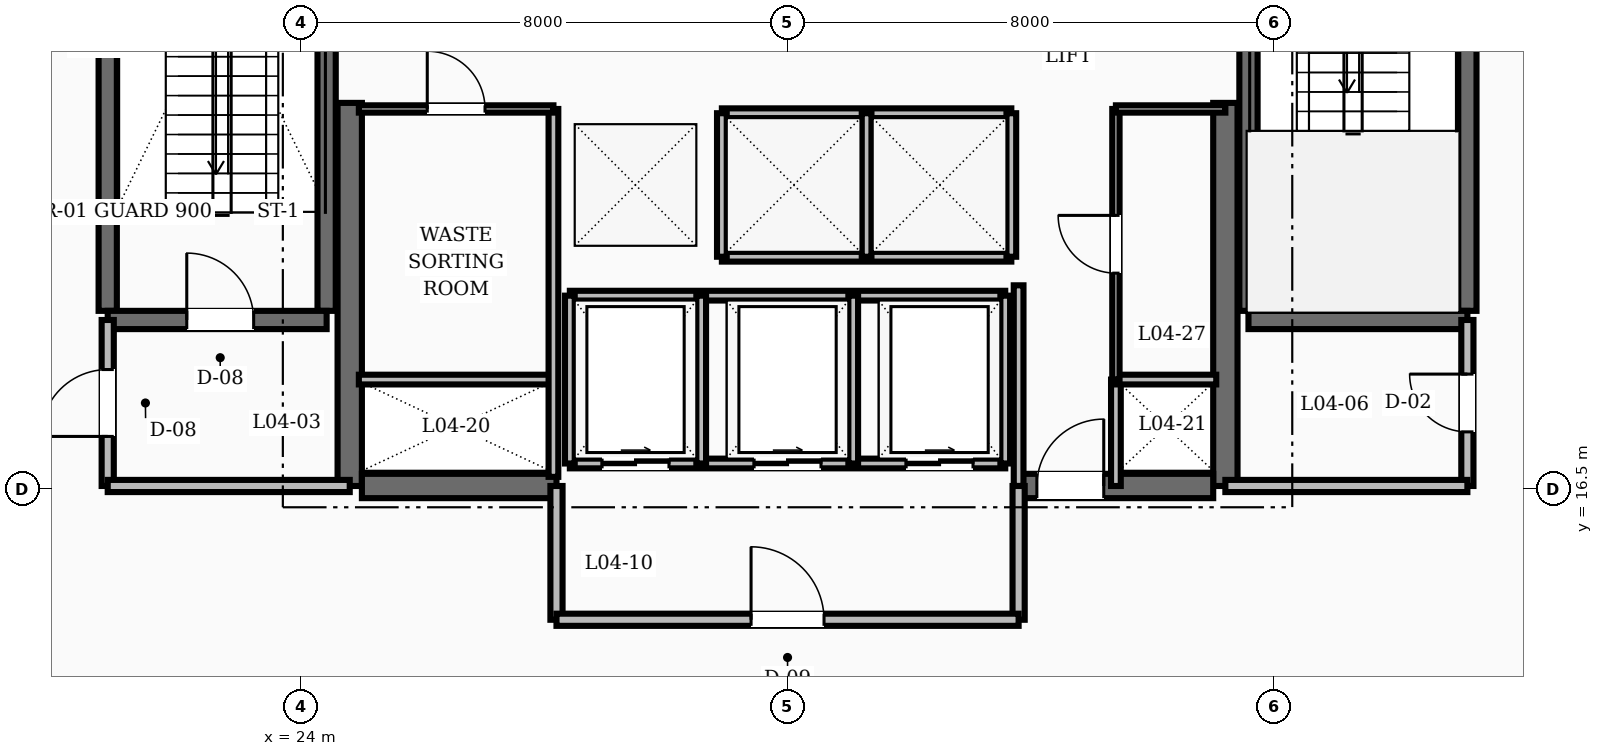
"""IFC4 building model, lengths in metres.
Left out: names, types, materials, properties, quantities, classifications, styles, units other than length and angle.
Written with IfcOpenShell. Run it as: python <this file> out.ifc"""

import sys

from ifc_helpers import new_model, si_unit, direction, frame, frame_2d, origin, place, context, subcontext, project, spatial, rectangle, extrude, element, fill, save


model = new_model("IFC4")
c1 = context("Model", 3, precision=1e-05, world=origin(), true_north=direction((0.0, 1.0)))
c2 = subcontext(c1, "Body", "Model", "MODEL_VIEW")
j1 = project(units=[si_unit("LENGTHUNIT", "METRE"), si_unit("PLANEANGLEUNIT", "RADIAN")], contexts=[c1])
p1 = place(None, origin())
s1 = spatial("IfcSite", under=j1, at=p1, CompositionType="ELEMENT")
p2 = place(p1, origin())
s2 = spatial("IfcBuilding", under=s1, at=p2, CompositionType="ELEMENT")
p3 = place(p2, frame((0.0, 0.0, 19.6)))
s3 = spatial("IfcBuildingStorey", under=s2, at=p3, CompositionType="ELEMENT", Elevation=19.6)
for number, where, z_axis, x_axis in (
    (1, (24.8, 16.55, 0.0), (0.0, 0.0, 1.0), (0.0, 1.0, 0.0)),
    (2, (39.2, 16.55, 0.0), (0.0, 0.0, 1.0), (0.0, 1.0, 0.0)),
):
    element("IfcWall", number, at=place(p3, frame(where, z_axis=z_axis, x_axis=x_axis)), inside=s3, PredefinedType="SHEAR", context=c2, shape_type="SweptSolid", body=[
        extrude(rectangle(XDim=6.3, YDim=0.4, at=frame_2d((3.15, 0.0))), origin(), (0.0, 0.0, 1.0), 4.8),
    ])
p4 = place(p3, frame((25.0, 16.55, 0.0), z_axis=(0.0, 0.0, 1.0), x_axis=(1.0, 0.0, 0.0)))
e3 = element("IfcWall", 3, at=p4, inside=s3, PredefinedType="SHEAR", context=c2, shape_type="SweptSolid", body=[
    extrude(rectangle(XDim=3.2, YDim=0.4, at=frame_2d((1.6, 0.0))), origin(), (0.0, 0.0, 1.0), 4.8),
])
p5 = place(p3, frame((35.8, 16.55, 0.0), z_axis=(0.0, 0.0, 1.0), x_axis=(1.0, 0.0, 0.0)))
e4 = element("IfcWall", 4, at=p5, inside=s3, PredefinedType="SHEAR", context=c2, shape_type="SweptSolid", body=[
    extrude(rectangle(XDim=3.2, YDim=0.4, at=frame_2d((1.6, 0.0))), origin(), (0.0, 0.0, 1.0), 4.8),
])
p6 = place(p5, frame((0.3, 0.0, 0.0)))
e5 = element("IfcOpeningElement", 5, at=p6, cuts=e4, PredefinedType="OPENING", context=c2, shape_type="SweptSolid", body=[
    extrude(rectangle(XDim=1.1, YDim=2.1, at=frame_2d((0.55, 1.05))), frame((0.0, 0.21, 0.0), z_axis=(0.0, -1.0, 0.0), x_axis=(1.0, 0.0, 0.0)), (0.0, 0.0, 1.0), 0.42),
])
for number, where, z_axis, x_axis in (
    (6, (20.82, 19.43, 0.0), (0.0, 0.0, 1.0), (0.0, 1.0, 0.0)),
    (7, (24.42, 19.43, 0.0), (0.0, 0.0, 1.0), (0.0, 1.0, 0.0)),
):
    element("IfcWall", number, at=place(p3, frame(where, z_axis=z_axis, x_axis=x_axis)), inside=s3, PredefinedType="SHEAR", context=c2, shape_type="SweptSolid", body=[
        extrude(rectangle(XDim=8.74, YDim=0.3, at=frame_2d((4.37, 0.0))), origin(), (0.0, 0.0, 1.0), 4.8),
    ])
p7 = place(p3, frame((20.82, 19.28, 0.0), z_axis=(0.0, 0.0, 1.0), x_axis=(1.0, 0.0, 0.0)))
e8 = element("IfcWall", 8, at=p7, inside=s3, PredefinedType="SHEAR", context=c2, shape_type="SweptSolid", body=[
    extrude(rectangle(XDim=3.6, YDim=0.3, at=frame_2d((1.8, 0.0))), origin(), (0.0, 0.0, 1.0), 4.8),
])
p8 = place(p7, frame((1.3, 0.0, 0.0)))
e9 = element("IfcOpeningElement", 9, at=p8, cuts=e8, PredefinedType="OPENING", context=c2, shape_type="SweptSolid", body=[
    extrude(rectangle(XDim=1.1, YDim=2.1, at=frame_2d((0.55, 1.05))), frame((0.0, 0.16, 0.0), z_axis=(0.0, -1.0, 0.0), x_axis=(1.0, 0.0, 0.0)), (0.0, 0.0, 1.0), 0.32),
])
for number, where, z_axis, x_axis in (
    (10, (43.18, 19.43, 0.0), (0.0, 0.0, 1.0), (0.0, 1.0, 0.0)),
    (11, (39.58, 19.43, 0.0), (0.0, 0.0, 1.0), (0.0, 1.0, 0.0)),
):
    element("IfcWall", number, at=place(p3, frame(where, z_axis=z_axis, x_axis=x_axis)), inside=s3, PredefinedType="SHEAR", context=c2, shape_type="SweptSolid", body=[
        extrude(rectangle(XDim=8.74, YDim=0.3, at=frame_2d((4.37, 0.0))), origin(), (0.0, 0.0, 1.0), 4.8),
    ])
p9 = place(p3, frame((39.58, 19.28, 0.0), z_axis=(0.0, 0.0, 1.0), x_axis=(1.0, 0.0, 0.0)))
e12 = element("IfcWall", 12, at=p9, inside=s3, PredefinedType="SHEAR", context=c2, shape_type="SweptSolid", body=[
    extrude(rectangle(XDim=3.6, YDim=0.3, at=frame_2d((1.8, 0.0))), origin(), (0.0, 0.0, 1.0), 4.8),
])
p10 = place(p3, frame((20.82, 16.55, 0.0), z_axis=(0.0, 0.0, 1.0), x_axis=(0.0, 1.0, 0.0)))
e13 = element("IfcWall", 13, at=p10, inside=s3, PredefinedType="SOLIDWALL", context=c2, shape_type="SweptSolid", body=[
    extrude(rectangle(XDim=2.73, YDim=0.2, at=frame_2d((1.365, 0.0))), origin(), (0.0, 0.0, 1.0), 3.42),
])
p11 = place(p10, frame((0.815, 0.0, 0.0)))
e14 = element("IfcOpeningElement", 14, at=p11, cuts=e13, PredefinedType="OPENING", context=c2, shape_type="SweptSolid", body=[
    extrude(rectangle(XDim=1.1, YDim=2.1, at=frame_2d((0.55, 1.05))), frame((0.0, 0.11, 0.0), z_axis=(0.0, -1.0, 0.0), x_axis=(1.0, 0.0, 0.0)), (0.0, 0.0, 1.0), 0.22),
])
p12 = place(p3, frame((20.82, 16.55, 0.0), z_axis=(0.0, 0.0, 1.0), x_axis=(1.0, 0.0, 0.0)))
e15 = element("IfcWall", 15, at=p12, inside=s3, PredefinedType="SOLIDWALL", context=c2, shape_type="SweptSolid", body=[
    extrude(rectangle(XDim=3.98, YDim=0.2, at=frame_2d((1.99, 0.0))), origin(), (0.0, 0.0, 1.0), 3.42),
])
p13 = place(p3, frame((43.18, 16.55, 0.0), z_axis=(0.0, 0.0, 1.0), x_axis=(0.0, 1.0, 0.0)))
e16 = element("IfcWall", 16, at=p13, inside=s3, PredefinedType="SOLIDWALL", context=c2, shape_type="SweptSolid", body=[
    extrude(rectangle(XDim=2.73, YDim=0.2, at=frame_2d((1.365, 0.0))), origin(), (0.0, 0.0, 1.0), 3.42),
])
p14 = place(p13, frame((0.89, 0.0, 0.0)))
e17 = element("IfcOpeningElement", 17, at=p14, cuts=e16, PredefinedType="OPENING", context=c2, shape_type="SweptSolid", body=[
    extrude(rectangle(XDim=0.95, YDim=2.1, at=frame_2d((0.475, 1.05))), frame((0.0, 0.11, 0.0), z_axis=(0.0, -1.0, 0.0), x_axis=(1.0, 0.0, 0.0)), (0.0, 0.0, 1.0), 0.22),
])
p15 = place(p3, frame((39.2, 16.55, 0.0), z_axis=(0.0, 0.0, 1.0), x_axis=(1.0, 0.0, 0.0)))
e18 = element("IfcWall", 18, at=p15, inside=s3, PredefinedType="SOLIDWALL", context=c2, shape_type="SweptSolid", body=[
    extrude(rectangle(XDim=3.98, YDim=0.2, at=frame_2d((1.99, 0.0))), origin(), (0.0, 0.0, 1.0), 3.42),
])
p16 = place(p3, frame((35.8, 16.55, 0.0), z_axis=(0.0, 0.0, 1.0), x_axis=(0.0, 1.0, 0.0)))
e19 = element("IfcWall", 19, at=p16, inside=s3, PredefinedType="SOLIDWALL", context=c2, shape_type="SweptSolid", body=[
    extrude(rectangle(XDim=3.3, YDim=0.16, at=frame_2d((1.65, 0.0))), origin(), (0.0, 0.0, 1.0), 3.42),
])
p17 = place(p3, frame((37.4, 16.55, 0.0), z_axis=(0.0, 0.0, 1.0), x_axis=(0.0, 1.0, 0.0)))
e20 = element("IfcWall", 20, at=p17, inside=s3, PredefinedType="SOLIDWALL", context=c2, shape_type="SweptSolid", body=[
    extrude(rectangle(XDim=1.75, YDim=0.16, at=frame_2d((0.875, 0.0))), origin(), (0.0, 0.0, 1.0), 3.42),
])
for number, where, z_axis, x_axis in (
    (21, (28.2, 14.35, 0.0), (0.0, 0.0, 1.0), (0.0, 1.0, 0.0)),
    (22, (35.8, 14.35, 0.0), (0.0, 0.0, 1.0), (0.0, 1.0, 0.0)),
):
    element("IfcWall", number, at=place(p3, frame(where, z_axis=z_axis, x_axis=x_axis)), inside=s3, PredefinedType="SOLIDWALL", context=c2, shape_type="SweptSolid", body=[
        extrude(rectangle(XDim=2.2, YDim=0.2, at=frame_2d((1.1, 0.0))), origin(), (0.0, 0.0, 1.0), 3.42),
    ])
p18 = place(p3, frame((28.2, 14.35, 0.0), z_axis=(0.0, 0.0, 1.0), x_axis=(1.0, 0.0, 0.0)))
e23 = element("IfcWall", 23, at=p18, inside=s3, PredefinedType="SOLIDWALL", context=c2, shape_type="SweptSolid", body=[
    extrude(rectangle(XDim=7.6, YDim=0.2, at=frame_2d((3.8, 0.0))), origin(), (0.0, 0.0, 1.0), 3.42),
])
p19 = place(p18, frame((3.2, 0.0, 0.0)))
e24 = element("IfcOpeningElement", 24, at=p19, cuts=e23, PredefinedType="OPENING", context=c2, shape_type="SweptSolid", body=[
    extrude(rectangle(XDim=1.2, YDim=2.1, at=frame_2d((0.6, 1.05))), frame((0.0, 0.11, 0.0), z_axis=(0.0, -1.0, 0.0), x_axis=(1.0, 0.0, 0.0)), (0.0, 0.0, 1.0), 0.22),
])
for number, where, z_axis, x_axis in (
    (25, (30.92, 22.68, 0.0), (0.0, 0.0, 1.0), (1.0, 0.0, 0.0)),
    (26, (30.92, 20.32, 0.0), (0.0, 0.0, 1.0), (1.0, 0.0, 0.0)),
):
    element("IfcWall", number, at=place(p3, frame(where, z_axis=z_axis, x_axis=x_axis)), inside=s3, PredefinedType="SOLIDWALL", context=c2, shape_type="SweptSolid", body=[
        extrude(rectangle(XDim=4.76, YDim=0.16, at=frame_2d((2.38, 0.0))), origin(), (0.0, 0.0, 1.0), 3.42),
    ])
for number, where, z_axis, x_axis in (
    (27, (30.92, 20.32, 0.0), (0.0, 0.0, 1.0), (0.0, 1.0, 0.0)),
    (28, (33.3, 20.32, 0.0), (0.0, 0.0, 1.0), (0.0, 1.0, 0.0)),
    (29, (35.68, 20.32, 0.0), (0.0, 0.0, 1.0), (0.0, 1.0, 0.0)),
):
    element("IfcWall", number, at=place(p3, frame(where, z_axis=z_axis, x_axis=x_axis)), inside=s3, PredefinedType="SOLIDWALL", context=c2, shape_type="SweptSolid", body=[
        extrude(rectangle(XDim=2.36, YDim=0.16, at=frame_2d((1.18, 0.0))), origin(), (0.0, 0.0, 1.0), 3.42),
    ])
p20 = place(p3, frame((28.42, 16.92, 0.0), z_axis=(0.0, 0.0, 1.0), x_axis=(1.0, 0.0, 0.0)))
e30 = element("IfcWall", 30, at=p20, inside=s3, PredefinedType="SOLIDWALL", context=c2, shape_type="SweptSolid", body=[
    extrude(rectangle(XDim=7.16, YDim=0.16, at=frame_2d((3.58, 0.0))), origin(), (0.0, 0.0, 1.0), 3.42),
])
p21 = place(p20, frame((0.53, 0.0, 0.0)))
e31 = element("IfcOpeningElement", 31, at=p21, cuts=e30, PredefinedType="OPENING", context=c2, shape_type="SweptSolid", body=[
    extrude(rectangle(XDim=1.1, YDim=2.15, at=frame_2d((0.55, 1.075))), frame((0.0, 0.09, 0.0), z_axis=(0.0, -1.0, 0.0), x_axis=(1.0, 0.0, 0.0)), (0.0, 0.0, 1.0), 0.18),
])
p22 = place(p20, frame((3.03, 0.0, 0.0)))
e32 = element("IfcOpeningElement", 32, at=p22, cuts=e30, PredefinedType="OPENING", context=c2, shape_type="SweptSolid", body=[
    extrude(rectangle(XDim=1.1, YDim=2.15, at=frame_2d((0.55, 1.075))), frame((0.0, 0.09, 0.0), z_axis=(0.0, -1.0, 0.0), x_axis=(1.0, 0.0, 0.0)), (0.0, 0.0, 1.0), 0.18),
])
p23 = place(p20, frame((5.53, 0.0, 0.0)))
e33 = element("IfcOpeningElement", 33, at=p23, cuts=e30, PredefinedType="OPENING", context=c2, shape_type="SweptSolid", body=[
    extrude(rectangle(XDim=1.1, YDim=2.15, at=frame_2d((0.55, 1.075))), frame((0.0, 0.09, 0.0), z_axis=(0.0, -1.0, 0.0), x_axis=(1.0, 0.0, 0.0)), (0.0, 0.0, 1.0), 0.18),
])
p24 = place(p3, frame((28.42, 19.68, 0.0), z_axis=(0.0, 0.0, 1.0), x_axis=(1.0, 0.0, 0.0)))
e34 = element("IfcWall", 34, at=p24, inside=s3, PredefinedType="SOLIDWALL", context=c2, shape_type="SweptSolid", body=[
    extrude(rectangle(XDim=7.16, YDim=0.16, at=frame_2d((3.58, 0.0))), origin(), (0.0, 0.0, 1.0), 3.42),
])
for number, where, z_axis, x_axis in (
    (35, (28.42, 16.92, 0.0), (0.0, 0.0, 1.0), (0.0, 1.0, 0.0)),
    (36, (30.58, 16.92, 0.0), (0.0, 0.0, 1.0), (0.0, 1.0, 0.0)),
    (37, (33.08, 16.92, 0.0), (0.0, 0.0, 1.0), (0.0, 1.0, 0.0)),
    (38, (35.58, 16.92, 0.0), (0.0, 0.0, 1.0), (0.0, 1.0, 0.0)),
):
    element("IfcWall", number, at=place(p3, frame(where, z_axis=z_axis, x_axis=x_axis)), inside=s3, PredefinedType="SOLIDWALL", context=c2, shape_type="SweptSolid", body=[
        extrude(rectangle(XDim=2.76, YDim=0.16, at=frame_2d((1.38, 0.0))), origin(), (0.0, 0.0, 1.0), 3.42),
    ])
p25 = place(p3, frame((24.95, 18.3, 0.0), z_axis=(0.0, 0.0, 1.0), x_axis=(1.0, 0.0, 0.0)))
e39 = element("IfcWall", 39, at=p25, inside=s3, PredefinedType="SOLIDWALL", context=c2, shape_type="SweptSolid", body=[
    extrude(rectangle(XDim=3.2, YDim=0.16, at=frame_2d((1.6, 0.0))), origin(), (0.0, 0.0, 1.0), 3.42),
])
p26 = place(p3, frame((28.15, 16.7, 0.0), z_axis=(0.0, 0.0, 1.0), x_axis=(0.0, 1.0, 0.0)))
e40 = element("IfcWall", 40, at=p26, inside=s3, PredefinedType="SOLIDWALL", context=c2, shape_type="SweptSolid", body=[
    extrude(rectangle(XDim=6.05, YDim=0.16, at=frame_2d((3.025, 0.0))), origin(), (0.0, 0.0, 1.0), 3.42),
])
p27 = place(p3, frame((37.4, 18.3, 0.0), z_axis=(0.0, 0.0, 1.0), x_axis=(1.0, 0.0, 0.0)))
e41 = element("IfcWall", 41, at=p27, inside=s3, PredefinedType="SOLIDWALL", context=c2, shape_type="SweptSolid", body=[
    extrude(rectangle(XDim=1.65, YDim=0.16, at=frame_2d((0.825, 0.0))), origin(), (0.0, 0.0, 1.0), 3.42),
])
p28 = place(p3, frame((24.95, 22.75, 0.0), z_axis=(0.0, 0.0, 1.0), x_axis=(1.0, 0.0, 0.0)))
e42 = element("IfcWall", 42, at=p28, inside=s3, PredefinedType="PARTITIONING", context=c2, shape_type="SweptSolid", body=[
    extrude(rectangle(XDim=3.2, YDim=0.12, at=frame_2d((1.6, 0.0))), origin(), (0.0, 0.0, 1.0), 3.42),
])
p29 = place(p28, frame((1.125, 0.0, 0.0)))
e43 = element("IfcOpeningElement", 43, at=p29, cuts=e42, PredefinedType="OPENING", context=c2, shape_type="SweptSolid", body=[
    extrude(rectangle(XDim=0.95, YDim=2.1, at=frame_2d((0.475, 1.05))), frame((0.0, 0.07, 0.0), z_axis=(0.0, -1.0, 0.0), x_axis=(1.0, 0.0, 0.0)), (0.0, 0.0, 1.0), 0.14),
])
p30 = place(p3, frame((37.4, 18.3, 0.0), z_axis=(0.0, 0.0, 1.0), x_axis=(0.0, 1.0, 0.0)))
e44 = element("IfcWall", 44, at=p30, inside=s3, PredefinedType="PARTITIONING", context=c2, shape_type="SweptSolid", body=[
    extrude(rectangle(XDim=4.45, YDim=0.12, at=frame_2d((2.225, 0.0))), origin(), (0.0, 0.0, 1.0), 3.42),
])
p31 = place(p30, frame((1.75, 0.0, 0.0)))
e45 = element("IfcOpeningElement", 45, at=p31, cuts=e44, PredefinedType="OPENING", context=c2, shape_type="SweptSolid", body=[
    extrude(rectangle(XDim=0.95, YDim=2.1, at=frame_2d((0.475, 1.05))), frame((0.0, 0.07, 0.0), z_axis=(0.0, -1.0, 0.0), x_axis=(1.0, 0.0, 0.0)), (0.0, 0.0, 1.0), 0.14),
])
p32 = place(p3, frame((37.4, 22.75, 0.0), z_axis=(0.0, 0.0, 1.0), x_axis=(1.0, 0.0, 0.0)))
e46 = element("IfcWall", 46, at=p32, inside=s3, PredefinedType="PARTITIONING", context=c2, shape_type="SweptSolid", body=[
    extrude(rectangle(XDim=1.8, YDim=0.12, at=frame_2d((0.9, 0.0))), origin(), (0.0, 0.0, 1.0), 3.42),
])
p33 = place(p8, origin())
e47 = element("IfcDoor", 47, at=p33, inside=s3, OperationType="SINGLE_SWING_LEFT", PredefinedType="DOOR", context=c2, shape_type="SweptSolid", body=[
    extrude(rectangle(XDim=1.1, YDim=2.1, at=frame_2d((0.55, 1.05))), frame((0.0, 0.025, 0.0), z_axis=(0.0, -1.0, 0.0), x_axis=(1.0, 0.0, 0.0)), (0.0, 0.0, 1.0), 0.05),
])
fill(e9, e47)
p34 = place(p11, origin())
e48 = element("IfcDoor", 48, at=p34, inside=s3, OperationType="SINGLE_SWING_LEFT", PredefinedType="DOOR", context=c2, shape_type="SweptSolid", body=[
    extrude(rectangle(XDim=1.1, YDim=2.1, at=frame_2d((0.55, 1.05))), frame((0.0, 0.025, 0.0), z_axis=(0.0, -1.0, 0.0), x_axis=(1.0, 0.0, 0.0)), (0.0, 0.0, 1.0), 0.05),
])
fill(e14, e48)
p35 = place(p14, origin())
e49 = element("IfcDoor", 49, at=p35, inside=s3, OperationType="SINGLE_SWING_RIGHT", PredefinedType="DOOR", context=c2, shape_type="SweptSolid", body=[
    extrude(rectangle(XDim=0.95, YDim=2.1, at=frame_2d((0.475, 1.05))), frame((0.0, 0.025, 0.0), z_axis=(0.0, -1.0, 0.0), x_axis=(1.0, 0.0, 0.0)), (0.0, 0.0, 1.0), 0.05),
])
fill(e17, e49)
p36 = place(p6, origin())
e50 = element("IfcDoor", 50, at=p36, inside=s3, OperationType="SINGLE_SWING_RIGHT", PredefinedType="DOOR", context=c2, shape_type="SweptSolid", body=[
    extrude(rectangle(XDim=1.1, YDim=2.1, at=frame_2d((0.55, 1.05))), frame((0.0, 0.025, 0.0), z_axis=(0.0, -1.0, 0.0), x_axis=(1.0, 0.0, 0.0)), (0.0, 0.0, 1.0), 0.05),
])
fill(e5, e50)
p37 = place(p19, origin())
e51 = element("IfcDoor", 51, at=p37, inside=s3, OperationType="SINGLE_SWING_LEFT", PredefinedType="DOOR", context=c2, shape_type="SweptSolid", body=[
    extrude(rectangle(XDim=1.2, YDim=2.1, at=frame_2d((0.6, 1.05))), frame((0.0, 0.025, 0.0), z_axis=(0.0, -1.0, 0.0), x_axis=(1.0, 0.0, 0.0)), (0.0, 0.0, 1.0), 0.05),
])
fill(e24, e51)
p38 = place(p21, origin())
e52 = element("IfcDoor", 52, at=p38, inside=s3, OperationType="SLIDING_TO_RIGHT", PredefinedType="DOOR", context=c2, shape_type="SweptSolid", body=[
    extrude(rectangle(XDim=1.1, YDim=2.15, at=frame_2d((0.55, 1.075))), frame((0.0, 0.025, 0.0), z_axis=(0.0, -1.0, 0.0), x_axis=(1.0, 0.0, 0.0)), (0.0, 0.0, 1.0), 0.05),
])
fill(e31, e52)
p39 = place(p22, origin())
e53 = element("IfcDoor", 53, at=p39, inside=s3, OperationType="SLIDING_TO_RIGHT", PredefinedType="DOOR", context=c2, shape_type="SweptSolid", body=[
    extrude(rectangle(XDim=1.1, YDim=2.15, at=frame_2d((0.55, 1.075))), frame((0.0, 0.025, 0.0), z_axis=(0.0, -1.0, 0.0), x_axis=(1.0, 0.0, 0.0)), (0.0, 0.0, 1.0), 0.05),
])
fill(e32, e53)
p40 = place(p23, origin())
e54 = element("IfcDoor", 54, at=p40, inside=s3, OperationType="SLIDING_TO_RIGHT", PredefinedType="DOOR", context=c2, shape_type="SweptSolid", body=[
    extrude(rectangle(XDim=1.1, YDim=2.15, at=frame_2d((0.55, 1.075))), frame((0.0, 0.025, 0.0), z_axis=(0.0, -1.0, 0.0), x_axis=(1.0, 0.0, 0.0)), (0.0, 0.0, 1.0), 0.05),
])
fill(e33, e54)
p41 = place(p29, origin())
e55 = element("IfcDoor", 55, at=p41, inside=s3, OperationType="SINGLE_SWING_LEFT", PredefinedType="DOOR", context=c2, shape_type="SweptSolid", body=[
    extrude(rectangle(XDim=0.95, YDim=2.1, at=frame_2d((0.475, 1.05))), frame((0.0, 0.025, 0.0), z_axis=(0.0, -1.0, 0.0), x_axis=(1.0, 0.0, 0.0)), (0.0, 0.0, 1.0), 0.05),
])
fill(e43, e55)
p42 = place(p31, origin())
e56 = element("IfcDoor", 56, at=p42, inside=s3, OperationType="SINGLE_SWING_RIGHT", PredefinedType="DOOR", context=c2, shape_type="SweptSolid", body=[
    extrude(rectangle(XDim=0.95, YDim=2.1, at=frame_2d((0.475, 1.05))), frame((0.0, 0.025, 0.0), z_axis=(0.0, -1.0, 0.0), x_axis=(1.0, 0.0, 0.0)), (0.0, 0.0, 1.0), 0.05),
])
fill(e45, e56)
save(model, sys.argv[1])
